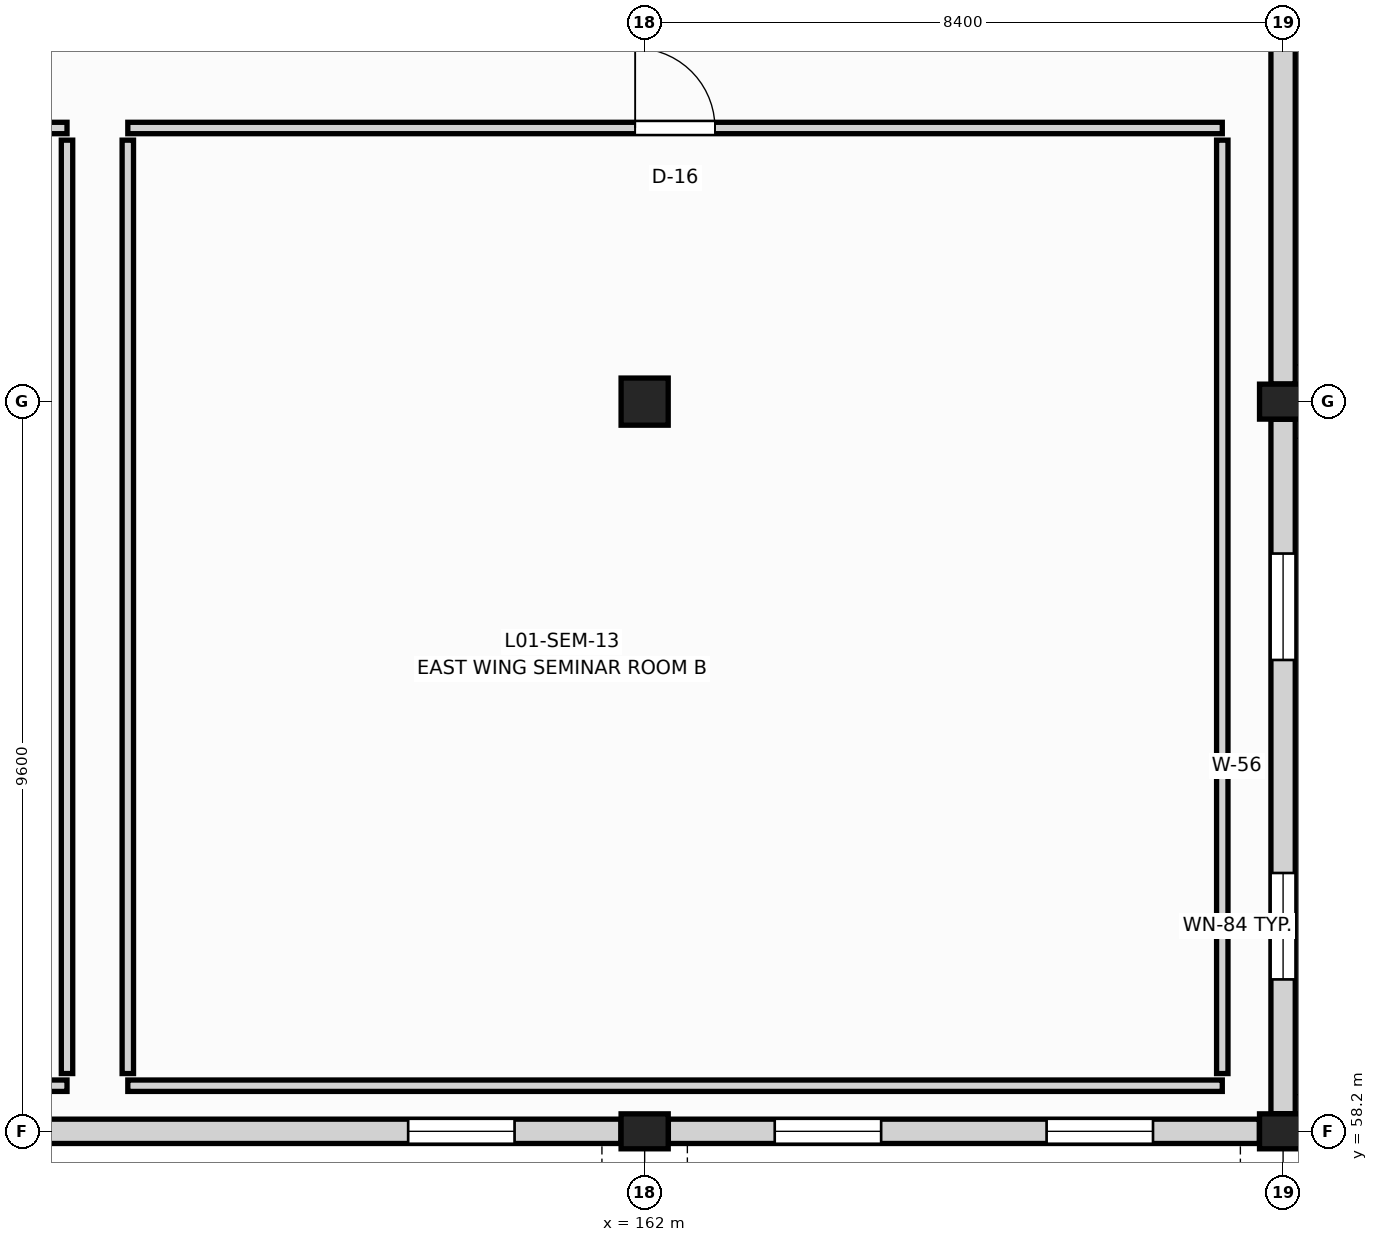
"""IFC4 building model, lengths in metres.
Left out: names, types, materials, properties, quantities, classifications, styles, units other than length and angle.
Written with IfcOpenShell. Run it as: python <this file> out.ifc"""

import sys

from ifc_helpers import new_model, si_unit, direction, frame, frame_2d, origin, origin_2d, place, context, subcontext, project, spatial, rectangle, extrude, element, fill, save


model = new_model("IFC4")
c1 = context("Model", 3, precision=1e-05, world=origin(), true_north=direction((0.0, 1.0)))
c2 = subcontext(c1, "Body", "Model", "MODEL_VIEW")
j1 = project(units=[si_unit("LENGTHUNIT", "METRE"), si_unit("PLANEANGLEUNIT", "RADIAN")], contexts=[c1])
p1 = place(None, origin())
s1 = spatial("IfcSite", under=j1, at=p1, CompositionType="ELEMENT")
p2 = place(p1, origin())
s2 = spatial("IfcBuilding", under=s1, at=p2, CompositionType="ELEMENT")
p3 = place(p2, frame((0.0, 0.0, 5.4)))
s3 = spatial("IfcBuildingStorey", under=s2, at=p3, CompositionType="ELEMENT", Elevation=5.4)
p4 = place(p3, frame((162.0, 58.2, 0.0), z_axis=(0.0, 0.0, 1.0), x_axis=(1.0, 0.0, 0.0)))
e1 = element("IfcColumn", 1, at=p4, inside=s3, PredefinedType="COLUMN", context=c2, shape_type="SweptSolid", body=[
    extrude(rectangle(XDim=0.62, YDim=0.46, at=origin_2d()), origin(), (0.0, 0.0, 1.0), 4.18),
])
p5 = place(p3, frame((162.0, 67.8, 0.0), z_axis=(0.0, 0.0, 1.0), x_axis=(1.0, 0.0, 0.0)))
e2 = element("IfcColumn", 2, at=p5, inside=s3, PredefinedType="COLUMN", context=c2, shape_type="SweptSolid", body=[
    extrude(rectangle(XDim=0.62, YDim=0.62, at=origin_2d()), origin(), (0.0, 0.0, 1.0), 4.18),
])
for number, where, z_axis, x_axis in (
    (3, (170.4, 58.2, 0.0), (0.0, 0.0, 1.0), (1.0, 0.0, 0.0)),
    (4, (170.4, 67.8, 0.0), (0.0, 0.0, 1.0), (1.0, 0.0, 0.0)),
):
    element("IfcColumn", number, at=place(p3, frame(where, z_axis=z_axis, x_axis=x_axis)), inside=s3, PredefinedType="COLUMN", context=c2, shape_type="SweptSolid", body=[
        extrude(rectangle(XDim=0.62, YDim=0.46, at=origin_2d()), origin(), (0.0, 0.0, 1.0), 4.18),
    ])
p6 = place(p3, frame((170.4, 58.432, 0.0), z_axis=(0.0, 0.0, 1.0), x_axis=(0.0, 1.0, 0.0)))
e5 = element("IfcWall", 5, at=p6, inside=s3, PredefinedType="SOLIDWALL", context=c2, shape_type="SweptSolid", body=[
    extrude(rectangle(XDim=9.136, YDim=0.32, at=frame_2d((4.568, 0.0))), origin(), (0.0, 0.0, 1.0), 3.38),
])
p7 = place(p6, frame((1.767, 0.0, 0.85)))
e6 = element("IfcOpeningElement", 6, at=p7, cuts=e5, PredefinedType="OPENING", context=c2, shape_type="SweptSolid", body=[
    extrude(rectangle(XDim=1.4, YDim=1.65, at=frame_2d((0.7, 0.825))), frame((0.0, 0.17, 0.0), z_axis=(0.0, -1.0, 0.0), x_axis=(1.0, 0.0, 0.0)), (0.0, 0.0, 1.0), 0.34),
])
p8 = place(p6, frame((5.969, 0.0, 0.85)))
e7 = element("IfcOpeningElement", 7, at=p8, cuts=e5, PredefinedType="OPENING", context=c2, shape_type="SweptSolid", body=[
    extrude(rectangle(XDim=1.4, YDim=1.65, at=frame_2d((0.7, 0.825))), frame((0.0, 0.17, 0.0), z_axis=(0.0, -1.0, 0.0), x_axis=(1.0, 0.0, 0.0)), (0.0, 0.0, 1.0), 0.34),
])
p9 = place(p3, frame((170.4, 68.032, 0.0), z_axis=(0.0, 0.0, 1.0), x_axis=(0.0, 1.0, 0.0)))
e8 = element("IfcWall", 8, at=p9, inside=s3, PredefinedType="SOLIDWALL", context=c2, shape_type="SweptSolid", body=[
    extrude(rectangle(XDim=9.136, YDim=0.32, at=frame_2d((4.568, 0.0))), origin(), (0.0, 0.0, 1.0), 3.38),
])
p10 = place(p9, frame((5.969, 0.0, 0.85)))
e9 = element("IfcOpeningElement", 9, at=p10, cuts=e8, PredefinedType="OPENING", context=c2, shape_type="SweptSolid", body=[
    extrude(rectangle(XDim=1.4, YDim=1.65, at=frame_2d((0.7, 0.825))), frame((0.0, 0.17, 0.0), z_axis=(0.0, -1.0, 0.0), x_axis=(1.0, 0.0, 0.0)), (0.0, 0.0, 1.0), 0.34),
])
p11 = place(p3, frame((153.912, 58.2, 0.0), z_axis=(0.0, 0.0, 1.0), x_axis=(1.0, 0.0, 0.0)))
e10 = element("IfcWall", 10, at=p11, inside=s3, PredefinedType="SOLIDWALL", context=c2, shape_type="SweptSolid", body=[
    extrude(rectangle(XDim=7.776, YDim=0.32, at=frame_2d((3.888, 0.0))), origin(), (0.0, 0.0, 1.0), 3.38),
])
p12 = place(p11, frame((4.977, 0.0, 0.85)))
e11 = element("IfcOpeningElement", 11, at=p12, cuts=e10, PredefinedType="OPENING", context=c2, shape_type="SweptSolid", body=[
    extrude(rectangle(XDim=1.4, YDim=1.65, at=frame_2d((0.7, 0.825))), frame((0.0, 0.17, 0.0), z_axis=(0.0, -1.0, 0.0), x_axis=(1.0, 0.0, 0.0)), (0.0, 0.0, 1.0), 0.34),
])
p13 = place(p3, frame((162.312, 58.2, 0.0), z_axis=(0.0, 0.0, 1.0), x_axis=(1.0, 0.0, 0.0)))
e12 = element("IfcWall", 12, at=p13, inside=s3, PredefinedType="SOLIDWALL", context=c2, shape_type="SweptSolid", body=[
    extrude(rectangle(XDim=7.776, YDim=0.32, at=frame_2d((3.888, 0.0))), origin(), (0.0, 0.0, 1.0), 3.38),
])
p14 = place(p13, frame((1.399, 0.0, 0.85)))
e13 = element("IfcOpeningElement", 13, at=p14, cuts=e12, PredefinedType="OPENING", context=c2, shape_type="SweptSolid", body=[
    extrude(rectangle(XDim=1.4, YDim=1.65, at=frame_2d((0.7, 0.825))), frame((0.0, 0.17, 0.0), z_axis=(0.0, -1.0, 0.0), x_axis=(1.0, 0.0, 0.0)), (0.0, 0.0, 1.0), 0.34),
])
p15 = place(p13, frame((4.977, 0.0, 0.85)))
e14 = element("IfcOpeningElement", 14, at=p15, cuts=e12, PredefinedType="OPENING", context=c2, shape_type="SweptSolid", body=[
    extrude(rectangle(XDim=1.4, YDim=1.65, at=frame_2d((0.7, 0.825))), frame((0.0, 0.17, 0.0), z_axis=(0.0, -1.0, 0.0), x_axis=(1.0, 0.0, 0.0)), (0.0, 0.0, 1.0), 0.34),
])
p16 = place(p3, frame((137.6, 58.8, 0.0), z_axis=(0.0, 0.0, 1.0), x_axis=(1.0, 0.0, 0.0)))
e15 = element("IfcWall", 15, at=p16, inside=s3, PredefinedType="PARTITIONING", context=c2, shape_type="SweptSolid", body=[
    extrude(rectangle(XDim=16.8, YDim=0.15, at=frame_2d((8.4, 0.0))), origin(), (0.0, 0.0, 1.0), 3.22),
])
p17 = place(p3, frame((137.6, 71.4, 0.0), z_axis=(0.0, 0.0, 1.0), x_axis=(1.0, 0.0, 0.0)))
e16 = element("IfcWall", 16, at=p17, inside=s3, PredefinedType="PARTITIONING", context=c2, shape_type="SweptSolid", body=[
    extrude(rectangle(XDim=16.8, YDim=0.15, at=frame_2d((8.4, 0.0))), origin(), (0.0, 0.0, 1.0), 3.22),
])
p18 = place(p17, frame((7.875, 0.0, 0.0)))
e17 = element("IfcOpeningElement", 17, at=p18, cuts=e16, PredefinedType="OPENING", context=c2, shape_type="SweptSolid", body=[
    extrude(rectangle(XDim=1.05, YDim=2.2, at=frame_2d((0.525, 1.1))), frame((0.0, 0.085, 0.0), z_axis=(0.0, -1.0, 0.0), x_axis=(1.0, 0.0, 0.0)), (0.0, 0.0, 1.0), 0.17),
])
p19 = place(p3, frame((154.4, 58.96, 0.0), z_axis=(0.0, 0.0, 1.0), x_axis=(0.0, 1.0, 0.0)))
e18 = element("IfcWall", 18, at=p19, inside=s3, PredefinedType="PARTITIONING", context=c2, shape_type="SweptSolid", body=[
    extrude(rectangle(XDim=12.28, YDim=0.15, at=frame_2d((6.14, 0.0))), origin(), (0.0, 0.0, 1.0), 3.22),
])
p20 = place(p3, frame((155.2, 58.8, 0.0), z_axis=(0.0, 0.0, 1.0), x_axis=(1.0, 0.0, 0.0)))
e19 = element("IfcWall", 19, at=p20, inside=s3, PredefinedType="PARTITIONING", context=c2, shape_type="SweptSolid", body=[
    extrude(rectangle(XDim=14.4, YDim=0.15, at=frame_2d((7.2, 0.0))), origin(), (0.0, 0.0, 1.0), 3.22),
])
p21 = place(p3, frame((155.2, 71.4, 0.0), z_axis=(0.0, 0.0, 1.0), x_axis=(1.0, 0.0, 0.0)))
e20 = element("IfcWall", 20, at=p21, inside=s3, PredefinedType="PARTITIONING", context=c2, shape_type="SweptSolid", body=[
    extrude(rectangle(XDim=14.4, YDim=0.15, at=frame_2d((7.2, 0.0))), origin(), (0.0, 0.0, 1.0), 3.22),
])
p22 = place(p21, frame((6.675, 0.0, 0.0)))
e21 = element("IfcOpeningElement", 21, at=p22, cuts=e20, PredefinedType="OPENING", context=c2, shape_type="SweptSolid", body=[
    extrude(rectangle(XDim=1.05, YDim=2.2, at=frame_2d((0.525, 1.1))), frame((0.0, 0.085, 0.0), z_axis=(0.0, -1.0, 0.0), x_axis=(1.0, 0.0, 0.0)), (0.0, 0.0, 1.0), 0.17),
])
for number, where, z_axis, x_axis in (
    (22, (155.2, 58.96, 0.0), (0.0, 0.0, 1.0), (0.0, 1.0, 0.0)),
    (23, (169.6, 58.96, 0.0), (0.0, 0.0, 1.0), (0.0, 1.0, 0.0)),
):
    element("IfcWall", number, at=place(p3, frame(where, z_axis=z_axis, x_axis=x_axis)), inside=s3, PredefinedType="PARTITIONING", context=c2, shape_type="SweptSolid", body=[
        extrude(rectangle(XDim=12.28, YDim=0.15, at=frame_2d((6.14, 0.0))), origin(), (0.0, 0.0, 1.0), 3.22),
    ])
p23 = place(p7, origin())
e24 = element("IfcWindow", 24, at=p23, inside=s3, PartitioningType="SINGLE_PANEL", PredefinedType="WINDOW", context=c2, shape_type="SweptSolid", body=[
    extrude(rectangle(XDim=1.4, YDim=1.65, at=frame_2d((0.7, 0.825))), frame((0.0, 0.03, 0.0), z_axis=(0.0, -1.0, 0.0), x_axis=(1.0, 0.0, 0.0)), (0.0, 0.0, 1.0), 0.06),
])
fill(e6, e24)
p24 = place(p8, origin())
e25 = element("IfcWindow", 25, at=p24, inside=s3, PartitioningType="SINGLE_PANEL", PredefinedType="WINDOW", context=c2, shape_type="SweptSolid", body=[
    extrude(rectangle(XDim=1.4, YDim=1.65, at=frame_2d((0.7, 0.825))), frame((0.0, 0.03, 0.0), z_axis=(0.0, -1.0, 0.0), x_axis=(1.0, 0.0, 0.0)), (0.0, 0.0, 1.0), 0.06),
])
fill(e7, e25)
p25 = place(p12, origin())
e26 = element("IfcWindow", 26, at=p25, inside=s3, PartitioningType="SINGLE_PANEL", PredefinedType="WINDOW", context=c2, shape_type="SweptSolid", body=[
    extrude(rectangle(XDim=1.4, YDim=1.65, at=frame_2d((0.7, 0.825))), frame((0.0, 0.03, 0.0), z_axis=(0.0, -1.0, 0.0), x_axis=(1.0, 0.0, 0.0)), (0.0, 0.0, 1.0), 0.06),
])
fill(e11, e26)
p26 = place(p14, origin())
e27 = element("IfcWindow", 27, at=p26, inside=s3, PartitioningType="SINGLE_PANEL", PredefinedType="WINDOW", context=c2, shape_type="SweptSolid", body=[
    extrude(rectangle(XDim=1.4, YDim=1.65, at=frame_2d((0.7, 0.825))), frame((0.0, 0.03, 0.0), z_axis=(0.0, -1.0, 0.0), x_axis=(1.0, 0.0, 0.0)), (0.0, 0.0, 1.0), 0.06),
])
fill(e13, e27)
p27 = place(p15, origin())
e28 = element("IfcWindow", 28, at=p27, inside=s3, PartitioningType="SINGLE_PANEL", PredefinedType="WINDOW", context=c2, shape_type="SweptSolid", body=[
    extrude(rectangle(XDim=1.4, YDim=1.65, at=frame_2d((0.7, 0.825))), frame((0.0, 0.03, 0.0), z_axis=(0.0, -1.0, 0.0), x_axis=(1.0, 0.0, 0.0)), (0.0, 0.0, 1.0), 0.06),
])
fill(e14, e28)
p28 = place(p22, origin())
e29 = element("IfcDoor", 29, at=p28, inside=s3, OperationType="SINGLE_SWING_LEFT", PredefinedType="DOOR", context=c2, shape_type="SweptSolid", body=[
    extrude(rectangle(XDim=1.05, YDim=2.2, at=frame_2d((0.525, 1.1))), frame((0.0, 0.025, 0.0), z_axis=(0.0, -1.0, 0.0), x_axis=(1.0, 0.0, 0.0)), (0.0, 0.0, 1.0), 0.05),
])
fill(e21, e29)
save(model, sys.argv[1])
